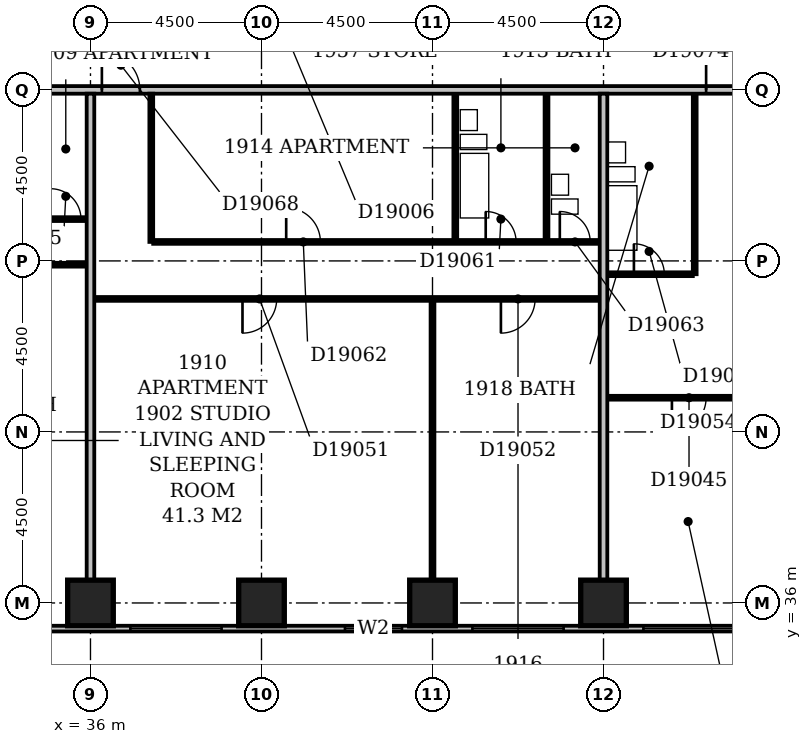
"""IFC4 building model, lengths in metres.
Left out: names, types, materials, properties, quantities, classifications, styles, units other than length and angle.
Written with IfcOpenShell. Run it as: python <this file> out.ifc"""

import sys

from ifc_helpers import new_model, si_unit, direction, frame, frame_2d, origin, origin_2d, place, context, subcontext, project, spatial, rectangle, extrude, element, fill, save


model = new_model("IFC4")
c1 = context("Model", 3, precision=1e-05, world=origin(), true_north=direction((0.0, 1.0)))
c2 = subcontext(c1, "Body", "Model", "MODEL_VIEW")
j1 = project(units=[si_unit("LENGTHUNIT", "METRE"), si_unit("PLANEANGLEUNIT", "RADIAN")], contexts=[c1])
p1 = place(None, origin())
s1 = spatial("IfcSite", under=j1, at=p1, CompositionType="ELEMENT")
p2 = place(p1, origin())
s2 = spatial("IfcBuilding", under=s1, at=p2, CompositionType="ELEMENT")
p3 = place(p2, frame((0.0, 0.0, 79.4)))
s3 = spatial("IfcBuildingStorey", under=s2, at=p3, CompositionType="ELEMENT", Elevation=79.4)
for number, where, z_axis, x_axis in (
    (1, (36.0, 36.0, -0.3), (0.0, 0.0, 1.0), (1.0, 0.0, 0.0)),
    (2, (40.5, 36.0, -0.3), (0.0, 0.0, 1.0), (1.0, 0.0, 0.0)),
    (3, (45.0, 36.0, -0.3), (0.0, 0.0, 1.0), (1.0, 0.0, 0.0)),
    (4, (49.5, 36.0, -0.3), (0.0, 0.0, 1.0), (1.0, 0.0, 0.0)),
):
    element("IfcColumn", number, at=place(p3, frame(where, z_axis=z_axis, x_axis=x_axis)), inside=s3, PredefinedType="COLUMN", context=c2, shape_type="SweptSolid", body=[
        extrude(rectangle(XDim=1.2, YDim=1.2, at=origin_2d()), origin(), (0.0, 0.0, 1.0), 3.6),
    ])
p4 = place(p3, frame((23.1, 35.325, 0.0), z_axis=(0.0, 0.0, 1.0), x_axis=(1.0, 0.0, 0.0)))
e5 = element("IfcWall", 5, at=p4, inside=s3, PredefinedType="STANDARD", context=c2, shape_type="SweptSolid", body=[
    extrude(rectangle(XDim=45.15, YDim=0.15, at=frame_2d((22.575, 0.0))), origin(), (0.0, 0.0, 1.0), 2.7),
])
p5 = place(p4, frame((0.45, 0.0, 0.6)))
e6 = element("IfcOpeningElement", 6, at=p5, cuts=e5, PredefinedType="OPENING", context=c2, shape_type="SweptSolid", body=[
    extrude(rectangle(XDim=2.4, YDim=1.8, at=frame_2d((1.2, 0.9))), frame((0.0, 0.087, 0.0), z_axis=(0.0, -1.0, 0.0), x_axis=(1.0, 0.0, 0.0)), (0.0, 0.0, 1.0), 0.174),
])
p6 = place(p4, frame((4.793, 0.0, 0.6)))
e7 = element("IfcOpeningElement", 7, at=p6, cuts=e5, PredefinedType="OPENING", context=c2, shape_type="SweptSolid", body=[
    extrude(rectangle(XDim=1.8, YDim=1.8, at=frame_2d((0.9, 0.9))), frame((0.0, 0.087, 0.0), z_axis=(0.0, -1.0, 0.0), x_axis=(1.0, 0.0, 0.0)), (0.0, 0.0, 1.0), 0.174),
])
p7 = place(p4, frame((9.45, 0.0, 0.6)))
e8 = element("IfcOpeningElement", 8, at=p7, cuts=e5, PredefinedType="OPENING", context=c2, shape_type="SweptSolid", body=[
    extrude(rectangle(XDim=2.4, YDim=1.8, at=frame_2d((1.2, 0.9))), frame((0.0, 0.087, 0.0), z_axis=(0.0, -1.0, 0.0), x_axis=(1.0, 0.0, 0.0)), (0.0, 0.0, 1.0), 0.174),
])
p8 = place(p4, frame((13.95, 0.0, 0.6)))
e9 = element("IfcOpeningElement", 9, at=p8, cuts=e5, PredefinedType="OPENING", context=c2, shape_type="SweptSolid", body=[
    extrude(rectangle(XDim=2.4, YDim=1.8, at=frame_2d((1.2, 0.9))), frame((0.0, 0.087, 0.0), z_axis=(0.0, -1.0, 0.0), x_axis=(1.0, 0.0, 0.0)), (0.0, 0.0, 1.0), 0.174),
])
p9 = place(p4, frame((19.597, 0.0, 0.6)))
e10 = element("IfcOpeningElement", 10, at=p9, cuts=e5, PredefinedType="OPENING", context=c2, shape_type="SweptSolid", body=[
    extrude(rectangle(XDim=1.5, YDim=1.8, at=frame_2d((0.75, 0.9))), frame((0.0, 0.087, 0.0), z_axis=(0.0, -1.0, 0.0), x_axis=(1.0, 0.0, 0.0)), (0.0, 0.0, 1.0), 0.174),
])
p10 = place(p4, frame((22.95, 0.0, 0.6)))
e11 = element("IfcOpeningElement", 11, at=p10, cuts=e5, PredefinedType="OPENING", context=c2, shape_type="SweptSolid", body=[
    extrude(rectangle(XDim=2.4, YDim=1.8, at=frame_2d((1.2, 0.9))), frame((0.0, 0.087, 0.0), z_axis=(0.0, -1.0, 0.0), x_axis=(1.0, 0.0, 0.0)), (0.0, 0.0, 1.0), 0.174),
])
p11 = place(p4, frame((27.45, 0.0, 0.6)))
e12 = element("IfcOpeningElement", 12, at=p11, cuts=e5, PredefinedType="OPENING", context=c2, shape_type="SweptSolid", body=[
    extrude(rectangle(XDim=2.4, YDim=1.8, at=frame_2d((1.2, 0.9))), frame((0.0, 0.087, 0.0), z_axis=(0.0, -1.0, 0.0), x_axis=(1.0, 0.0, 0.0)), (0.0, 0.0, 1.0), 0.174),
])
p12 = place(p4, frame((31.95, 0.0, 0.6)))
e13 = element("IfcOpeningElement", 13, at=p12, cuts=e5, PredefinedType="OPENING", context=c2, shape_type="SweptSolid", body=[
    extrude(rectangle(XDim=2.4, YDim=1.8, at=frame_2d((1.2, 0.9))), frame((0.0, 0.087, 0.0), z_axis=(0.0, -1.0, 0.0), x_axis=(1.0, 0.0, 0.0)), (0.0, 0.0, 1.0), 0.174),
])
p13 = place(p4, frame((37.861, 0.0, 0.6)))
e14 = element("IfcOpeningElement", 14, at=p13, cuts=e5, PredefinedType="OPENING", context=c2, shape_type="SweptSolid", body=[
    extrude(rectangle(XDim=1.2, YDim=1.8, at=frame_2d((0.6, 0.9))), frame((0.0, 0.087, 0.0), z_axis=(0.0, -1.0, 0.0), x_axis=(1.0, 0.0, 0.0)), (0.0, 0.0, 1.0), 0.174),
])
p14 = place(p4, frame((40.95, 0.0, 0.6)))
e15 = element("IfcOpeningElement", 15, at=p14, cuts=e5, PredefinedType="OPENING", context=c2, shape_type="SweptSolid", body=[
    extrude(rectangle(XDim=2.4, YDim=1.8, at=frame_2d((1.2, 0.9))), frame((0.0, 0.087, 0.0), z_axis=(0.0, -1.0, 0.0), x_axis=(1.0, 0.0, 0.0)), (0.0, 0.0, 1.0), 0.174),
])
p15 = place(p3, frame((36.0, 36.6, 0.0), z_axis=(0.0, 0.0, 1.0), x_axis=(0.0, 1.0, 0.0)))
e16 = element("IfcWall", 16, at=p15, inside=s3, PredefinedType="PARTITIONING", context=c2, shape_type="SweptSolid", body=[
    extrude(rectangle(XDim=12.8, YDim=0.2, at=frame_2d((6.4, 0.0))), origin(), (0.0, 0.0, 1.0), 2.4),
])
p16 = place(p3, frame((45.0, 36.6, 0.0), z_axis=(0.0, 0.0, 1.0), x_axis=(0.0, 1.0, 0.0)))
e17 = element("IfcWall", 17, at=p16, inside=s3, PredefinedType="PARTITIONING", context=c2, shape_type="SweptSolid", body=[
    extrude(rectangle(XDim=7.35, YDim=0.1, at=frame_2d((3.675, 0.0))), origin(), (0.0, 0.0, 1.0), 2.6),
])
p17 = place(p3, frame((49.5, 36.6, 0.0), z_axis=(0.0, 0.0, 1.0), x_axis=(0.0, 1.0, 0.0)))
e18 = element("IfcWall", 18, at=p17, inside=s3, PredefinedType="PARTITIONING", context=c2, shape_type="SweptSolid", body=[
    extrude(rectangle(XDim=12.8, YDim=0.2, at=frame_2d((6.4, 0.0))), origin(), (0.0, 0.0, 1.0), 3.3),
])
p18 = place(p3, frame((49.6, 41.4, 0.0), z_axis=(0.0, 0.0, 1.0), x_axis=(1.0, 0.0, 0.0)))
e19 = element("IfcWall", 19, at=p18, inside=s3, PredefinedType="PARTITIONING", context=c2, shape_type="SweptSolid", body=[
    extrude(rectangle(XDim=18.5, YDim=0.1, at=frame_2d((9.25, 0.0))), origin(), (0.0, 0.0, 1.0), 3.3),
])
p19 = place(p18, frame((1.7, 0.0, 0.0)))
e20 = element("IfcOpeningElement", 20, at=p19, cuts=e19, PredefinedType="OPENING", context=c2, shape_type="SweptSolid", body=[
    extrude(rectangle(XDim=0.9, YDim=2.1, at=frame_2d((0.45, 1.05))), frame((0.0, 0.062, 0.0), z_axis=(0.0, -1.0, 0.0), x_axis=(1.0, 0.0, 0.0)), (0.0, 0.0, 1.0), 0.124),
])
p20 = place(p18, frame((6.2, 0.0, 0.0)))
e21 = element("IfcOpeningElement", 21, at=p20, cuts=e19, PredefinedType="OPENING", context=c2, shape_type="SweptSolid", body=[
    extrude(rectangle(XDim=0.9, YDim=2.1, at=frame_2d((0.45, 1.05))), frame((0.0, 0.062, 0.0), z_axis=(0.0, -1.0, 0.0), x_axis=(1.0, 0.0, 0.0)), (0.0, 0.0, 1.0), 0.124),
])
p21 = place(p18, frame((11.85, 0.0, 0.0)))
e22 = element("IfcOpeningElement", 22, at=p21, cuts=e19, PredefinedType="OPENING", context=c2, shape_type="SweptSolid", body=[
    extrude(rectangle(XDim=0.9, YDim=2.1, at=frame_2d((0.45, 1.05))), frame((0.0, 0.062, 0.0), z_axis=(0.0, -1.0, 0.0), x_axis=(1.0, 0.0, 0.0)), (0.0, 0.0, 1.0), 0.124),
])
p22 = place(p18, frame((15.2, 0.0, 0.0)))
e23 = element("IfcOpeningElement", 23, at=p22, cuts=e19, PredefinedType="OPENING", context=c2, shape_type="SweptSolid", body=[
    extrude(rectangle(XDim=0.9, YDim=2.1, at=frame_2d((0.45, 1.05))), frame((0.0, 0.062, 0.0), z_axis=(0.0, -1.0, 0.0), x_axis=(1.0, 0.0, 0.0)), (0.0, 0.0, 1.0), 0.124),
])
p23 = place(p3, frame((36.1, 44.0, 0.0), z_axis=(0.0, 0.0, 1.0), x_axis=(1.0, 0.0, 0.0)))
e24 = element("IfcWall", 24, at=p23, inside=s3, PredefinedType="PARTITIONING", context=c2, shape_type="SweptSolid", body=[
    extrude(rectangle(XDim=13.3, YDim=0.1, at=frame_2d((6.65, 0.0))), origin(), (0.0, 0.0, 1.0), 3.3),
])
p24 = place(p23, frame((3.9, 0.0, 0.0)))
e25 = element("IfcOpeningElement", 25, at=p24, cuts=e24, PredefinedType="OPENING", context=c2, shape_type="SweptSolid", body=[
    extrude(rectangle(XDim=0.9, YDim=2.1, at=frame_2d((0.45, 1.05))), frame((0.0, 0.062, 0.0), z_axis=(0.0, -1.0, 0.0), x_axis=(1.0, 0.0, 0.0)), (0.0, 0.0, 1.0), 0.124),
])
p25 = place(p23, frame((10.7, 0.0, 0.0)))
e26 = element("IfcOpeningElement", 26, at=p25, cuts=e24, PredefinedType="OPENING", context=c2, shape_type="SweptSolid", body=[
    extrude(rectangle(XDim=0.9, YDim=2.1, at=frame_2d((0.45, 1.05))), frame((0.0, 0.062, 0.0), z_axis=(0.0, -1.0, 0.0), x_axis=(1.0, 0.0, 0.0)), (0.0, 0.0, 1.0), 0.124),
])
p26 = place(p3, frame((49.6, 44.65, 0.0), z_axis=(0.0, 0.0, 1.0), x_axis=(1.0, 0.0, 0.0)))
e27 = element("IfcWall", 27, at=p26, inside=s3, PredefinedType="PARTITIONING", context=c2, shape_type="SweptSolid", body=[
    extrude(rectangle(XDim=2.25, YDim=0.1, at=frame_2d((1.125, 0.0))), origin(), (0.0, 0.0, 1.0), 3.3),
])
p27 = place(p26, frame((0.7, 0.0, 0.0)))
e28 = element("IfcOpeningElement", 28, at=p27, cuts=e27, PredefinedType="OPENING", context=c2, shape_type="SweptSolid", body=[
    extrude(rectangle(XDim=0.8, YDim=2.1, at=frame_2d((0.4, 1.05))), frame((0.0, 0.062, 0.0), z_axis=(0.0, -1.0, 0.0), x_axis=(1.0, 0.0, 0.0)), (0.0, 0.0, 1.0), 0.124),
])
p28 = place(p3, frame((51.9, 44.65, 0.0), z_axis=(0.0, 0.0, 1.0), x_axis=(0.0, 1.0, 0.0)))
e29 = element("IfcWall", 29, at=p28, inside=s3, PredefinedType="PLUMBINGWALL", context=c2, shape_type="SweptSolid", body=[
    extrude(rectangle(XDim=4.75, YDim=0.1, at=frame_2d((2.375, 0.0))), origin(), (0.0, 0.0, 1.0), 3.3),
])
p29 = place(p3, frame((31.6, 44.9, 0.0), z_axis=(0.0, 0.0, 1.0), x_axis=(1.0, 0.0, 0.0)))
e30 = element("IfcWall", 30, at=p29, inside=s3, PredefinedType="PARTITIONING", context=c2, shape_type="SweptSolid", body=[
    extrude(rectangle(XDim=4.3, YDim=0.1, at=frame_2d((2.15, 0.0))), origin(), (0.0, 0.0, 1.0), 3.3),
])
p30 = place(p29, frame((1.7, 0.0, 0.0)))
e31 = element("IfcOpeningElement", 31, at=p30, cuts=e30, PredefinedType="OPENING", context=c2, shape_type="SweptSolid", body=[
    extrude(rectangle(XDim=0.9, YDim=2.1, at=frame_2d((0.45, 1.05))), frame((0.0, 0.062, 0.0), z_axis=(0.0, -1.0, 0.0), x_axis=(1.0, 0.0, 0.0)), (0.0, 0.0, 1.0), 0.124),
])
p31 = place(p3, frame((37.6, 45.5, 0.0), z_axis=(0.0, 0.0, 1.0), x_axis=(0.0, 1.0, 0.0)))
e32 = element("IfcWall", 32, at=p31, inside=s3, PredefinedType="PARTITIONING", context=c2, shape_type="SweptSolid", body=[
    extrude(rectangle(XDim=3.9, YDim=0.1, at=frame_2d((1.95, 0.0))), origin(), (0.0, 0.0, 1.0), 3.3),
])
p32 = place(p3, frame((37.65, 45.5, 0.0), z_axis=(0.0, 0.0, 1.0), x_axis=(1.0, 0.0, 0.0)))
e33 = element("IfcWall", 33, at=p32, inside=s3, PredefinedType="PARTITIONING", context=c2, shape_type="SweptSolid", body=[
    extrude(rectangle(XDim=11.75, YDim=0.1, at=frame_2d((5.875, 0.0))), origin(), (0.0, 0.0, 1.0), 3.3),
])
p33 = place(p32, frame((8.75, 0.0, 0.0)))
e34 = element("IfcOpeningElement", 34, at=p33, cuts=e33, PredefinedType="OPENING", context=c2, shape_type="SweptSolid", body=[
    extrude(rectangle(XDim=0.8, YDim=2.1, at=frame_2d((0.4, 1.05))), frame((0.0, 0.062, 0.0), z_axis=(0.0, -1.0, 0.0), x_axis=(1.0, 0.0, 0.0)), (0.0, 0.0, 1.0), 0.124),
])
p34 = place(p32, frame((3.5, 0.0, 0.0)))
e35 = element("IfcOpeningElement", 35, at=p34, cuts=e33, PredefinedType="OPENING", context=c2, shape_type="SweptSolid", body=[
    extrude(rectangle(XDim=0.9, YDim=2.1, at=frame_2d((0.45, 1.05))), frame((0.0, 0.062, 0.0), z_axis=(0.0, -1.0, 0.0), x_axis=(1.0, 0.0, 0.0)), (0.0, 0.0, 1.0), 0.124),
])
p35 = place(p32, frame((10.7, 0.0, 0.0)))
e36 = element("IfcOpeningElement", 36, at=p35, cuts=e33, PredefinedType="OPENING", context=c2, shape_type="SweptSolid", body=[
    extrude(rectangle(XDim=0.8, YDim=2.1, at=frame_2d((0.4, 1.05))), frame((0.0, 0.062, 0.0), z_axis=(0.0, -1.0, 0.0), x_axis=(1.0, 0.0, 0.0)), (0.0, 0.0, 1.0), 0.124),
])
p36 = place(p3, frame((45.6, 45.55, 0.0), z_axis=(0.0, 0.0, 1.0), x_axis=(0.0, 1.0, 0.0)))
e37 = element("IfcWall", 37, at=p36, inside=s3, PredefinedType="PLUMBINGWALL", context=c2, shape_type="SweptSolid", body=[
    extrude(rectangle(XDim=3.85, YDim=0.1, at=frame_2d((1.925, 0.0))), origin(), (0.0, 0.0, 1.0), 2.6),
])
p37 = place(p3, frame((48.0, 45.55, 0.0), z_axis=(0.0, 0.0, 1.0), x_axis=(0.0, 1.0, 0.0)))
e38 = element("IfcWall", 38, at=p37, inside=s3, PredefinedType="PLUMBINGWALL", context=c2, shape_type="SweptSolid", body=[
    extrude(rectangle(XDim=3.85, YDim=0.1, at=frame_2d((1.925, 0.0))), origin(), (0.0, 0.0, 1.0), 3.3),
])
p38 = place(p3, frame((34.75, 46.1, 0.0), z_axis=(0.0, 0.0, 1.0), x_axis=(1.0, 0.0, 0.0)))
e39 = element("IfcWall", 39, at=p38, inside=s3, PredefinedType="PARTITIONING", context=c2, shape_type="SweptSolid", body=[
    extrude(rectangle(XDim=1.15, YDim=0.1, at=frame_2d((0.575, 0.0))), origin(), (0.0, 0.0, 1.0), 3.3),
])
p39 = place(p38, frame((0.2, 0.0, 0.0)))
e40 = element("IfcOpeningElement", 40, at=p39, cuts=e39, PredefinedType="OPENING", context=c2, shape_type="SweptSolid", body=[
    extrude(rectangle(XDim=0.8, YDim=2.1, at=frame_2d((0.4, 1.05))), frame((0.0, 0.062, 0.0), z_axis=(0.0, -1.0, 0.0), x_axis=(1.0, 0.0, 0.0)), (0.0, 0.0, 1.0), 0.124),
])
p40 = place(p3, frame((9.1, 49.5, 0.0), z_axis=(0.0, 0.0, 1.0), x_axis=(1.0, 0.0, 0.0)))
e41 = element("IfcWall", 41, at=p40, inside=s3, PredefinedType="PARTITIONING", context=c2, shape_type="SweptSolid", body=[
    extrude(rectangle(XDim=57.8, YDim=0.2, at=frame_2d((28.9, 0.0))), origin(), (0.0, 0.0, 1.0), 3.3),
])
p41 = place(p40, frame((18.7, 0.0, 0.0)))
e42 = element("IfcOpeningElement", 42, at=p41, cuts=e41, PredefinedType="OPENING", context=c2, shape_type="SweptSolid", body=[
    extrude(rectangle(XDim=1.0, YDim=2.1, at=frame_2d((0.5, 1.05))), frame((0.0, 0.112, 0.0), z_axis=(0.0, -1.0, 0.0), x_axis=(1.0, 0.0, 0.0)), (0.0, 0.0, 1.0), 0.224),
])
p42 = place(p40, frame((24.35, 0.0, 0.0)))
e43 = element("IfcOpeningElement", 43, at=p42, cuts=e41, PredefinedType="OPENING", context=c2, shape_type="SweptSolid", body=[
    extrude(rectangle(XDim=1.0, YDim=2.1, at=frame_2d((0.5, 1.05))), frame((0.0, 0.112, 0.0), z_axis=(0.0, -1.0, 0.0), x_axis=(1.0, 0.0, 0.0)), (0.0, 0.0, 1.0), 0.224),
])
p43 = place(p40, frame((27.2, 0.0, 0.0)))
e44 = element("IfcOpeningElement", 44, at=p43, cuts=e41, PredefinedType="OPENING", context=c2, shape_type="SweptSolid", body=[
    extrude(rectangle(XDim=1.0, YDim=2.1, at=frame_2d((0.5, 1.05))), frame((0.0, 0.112, 0.0), z_axis=(0.0, -1.0, 0.0), x_axis=(1.0, 0.0, 0.0)), (0.0, 0.0, 1.0), 0.224),
])
p44 = place(p40, frame((43.1, 0.0, 0.0)))
e45 = element("IfcOpeningElement", 45, at=p44, cuts=e41, PredefinedType="OPENING", context=c2, shape_type="SweptSolid", body=[
    extrude(rectangle(XDim=1.0, YDim=2.1, at=frame_2d((0.5, 1.05))), frame((0.0, 0.112, 0.0), z_axis=(0.0, -1.0, 0.0), x_axis=(1.0, 0.0, 0.0)), (0.0, 0.0, 1.0), 0.224),
])
p45 = place(p40, frame((3.9, 0.0, 0.0)))
e46 = element("IfcOpeningElement", 46, at=p45, cuts=e41, PredefinedType="OPENING", context=c2, shape_type="SweptSolid", body=[
    extrude(rectangle(XDim=0.9, YDim=2.1, at=frame_2d((0.45, 1.05))), frame((0.0, 0.112, 0.0), z_axis=(0.0, -1.0, 0.0), x_axis=(1.0, 0.0, 0.0)), (0.0, 0.0, 1.0), 0.224),
])
p46 = place(p8, origin())
e47 = element("IfcWindow", 47, at=p46, inside=s3, PartitioningType="SINGLE_PANEL", PredefinedType="WINDOW", context=c2, shape_type="SweptSolid", body=[
    extrude(rectangle(XDim=2.4, YDim=1.8, at=frame_2d((1.2, 0.9))), frame((0.0, 0.03, 0.0), z_axis=(0.0, -1.0, 0.0), x_axis=(1.0, 0.0, 0.0)), (0.0, 0.0, 1.0), 0.06),
])
fill(e9, e47)
p47 = place(p9, origin())
e48 = element("IfcWindow", 48, at=p47, inside=s3, PartitioningType="SINGLE_PANEL", PredefinedType="WINDOW", context=c2, shape_type="SweptSolid", body=[
    extrude(rectangle(XDim=1.5, YDim=1.8, at=frame_2d((0.75, 0.9))), frame((0.0, 0.03, 0.0), z_axis=(0.0, -1.0, 0.0), x_axis=(1.0, 0.0, 0.0)), (0.0, 0.0, 1.0), 0.06),
])
fill(e10, e48)
p48 = place(p10, origin())
e49 = element("IfcWindow", 49, at=p48, inside=s3, PartitioningType="SINGLE_PANEL", PredefinedType="WINDOW", context=c2, shape_type="SweptSolid", body=[
    extrude(rectangle(XDim=2.4, YDim=1.8, at=frame_2d((1.2, 0.9))), frame((0.0, 0.03, 0.0), z_axis=(0.0, -1.0, 0.0), x_axis=(1.0, 0.0, 0.0)), (0.0, 0.0, 1.0), 0.06),
])
fill(e11, e49)
p49 = place(p11, origin())
e50 = element("IfcWindow", 50, at=p49, inside=s3, PartitioningType="SINGLE_PANEL", PredefinedType="WINDOW", context=c2, shape_type="SweptSolid", body=[
    extrude(rectangle(XDim=2.4, YDim=1.8, at=frame_2d((1.2, 0.9))), frame((0.0, 0.03, 0.0), z_axis=(0.0, -1.0, 0.0), x_axis=(1.0, 0.0, 0.0)), (0.0, 0.0, 1.0), 0.06),
])
fill(e12, e50)
p50 = place(p19, frame((0.9, 0.0, 0.0), z_axis=(0.0, 0.0, 1.0), x_axis=(-1.0, 0.0, 0.0)))
e51 = element("IfcDoor", 51, at=p50, inside=s3, OperationType="SINGLE_SWING_RIGHT", PredefinedType="DOOR", context=c2, shape_type="SweptSolid", body=[
    extrude(rectangle(XDim=0.9, YDim=2.1, at=frame_2d((0.45, 1.05))), frame((0.0, 0.025, 0.0), z_axis=(0.0, -1.0, 0.0), x_axis=(1.0, 0.0, 0.0)), (0.0, 0.0, 1.0), 0.05),
])
fill(e20, e51)
p51 = place(p24, frame((0.9, 0.0, 0.0), z_axis=(0.0, 0.0, 1.0), x_axis=(-1.0, 0.0, 0.0)))
e52 = element("IfcDoor", 52, at=p51, inside=s3, OperationType="SINGLE_SWING_RIGHT", PredefinedType="DOOR", context=c2, shape_type="SweptSolid", body=[
    extrude(rectangle(XDim=0.9, YDim=2.1, at=frame_2d((0.45, 1.05))), frame((0.0, 0.025, 0.0), z_axis=(0.0, -1.0, 0.0), x_axis=(1.0, 0.0, 0.0)), (0.0, 0.0, 1.0), 0.05),
])
fill(e25, e52)
p52 = place(p25, frame((0.9, 0.0, 0.0), z_axis=(0.0, 0.0, 1.0), x_axis=(-1.0, 0.0, 0.0)))
e53 = element("IfcDoor", 53, at=p52, inside=s3, OperationType="SINGLE_SWING_RIGHT", PredefinedType="DOOR", context=c2, shape_type="SweptSolid", body=[
    extrude(rectangle(XDim=0.9, YDim=2.1, at=frame_2d((0.45, 1.05))), frame((0.0, 0.025, 0.0), z_axis=(0.0, -1.0, 0.0), x_axis=(1.0, 0.0, 0.0)), (0.0, 0.0, 1.0), 0.05),
])
fill(e26, e53)
p53 = place(p27, origin())
e54 = element("IfcDoor", 54, at=p53, inside=s3, OperationType="SINGLE_SWING_LEFT", PredefinedType="DOOR", context=c2, shape_type="SweptSolid", body=[
    extrude(rectangle(XDim=0.8, YDim=2.1, at=frame_2d((0.4, 1.05))), frame((0.0, 0.025, 0.0), z_axis=(0.0, -1.0, 0.0), x_axis=(1.0, 0.0, 0.0)), (0.0, 0.0, 1.0), 0.05),
])
fill(e28, e54)
p54 = place(p33, origin())
e55 = element("IfcDoor", 55, at=p54, inside=s3, OperationType="SINGLE_SWING_LEFT", PredefinedType="DOOR", context=c2, shape_type="SweptSolid", body=[
    extrude(rectangle(XDim=0.8, YDim=2.1, at=frame_2d((0.4, 1.05))), frame((0.0, 0.025, 0.0), z_axis=(0.0, -1.0, 0.0), x_axis=(1.0, 0.0, 0.0)), (0.0, 0.0, 1.0), 0.05),
])
fill(e34, e55)
p55 = place(p34, origin())
e56 = element("IfcDoor", 56, at=p55, inside=s3, OperationType="SINGLE_SWING_LEFT", PredefinedType="DOOR", context=c2, shape_type="SweptSolid", body=[
    extrude(rectangle(XDim=0.9, YDim=2.1, at=frame_2d((0.45, 1.05))), frame((0.0, 0.025, 0.0), z_axis=(0.0, -1.0, 0.0), x_axis=(1.0, 0.0, 0.0)), (0.0, 0.0, 1.0), 0.05),
])
fill(e35, e56)
p56 = place(p35, origin())
e57 = element("IfcDoor", 57, at=p56, inside=s3, OperationType="SINGLE_SWING_LEFT", PredefinedType="DOOR", context=c2, shape_type="SweptSolid", body=[
    extrude(rectangle(XDim=0.8, YDim=2.1, at=frame_2d((0.4, 1.05))), frame((0.0, 0.025, 0.0), z_axis=(0.0, -1.0, 0.0), x_axis=(1.0, 0.0, 0.0)), (0.0, 0.0, 1.0), 0.05),
])
fill(e36, e57)
p57 = place(p39, origin())
e58 = element("IfcDoor", 58, at=p57, inside=s3, OperationType="SINGLE_SWING_LEFT", PredefinedType="DOOR", context=c2, shape_type="SweptSolid", body=[
    extrude(rectangle(XDim=0.8, YDim=2.1, at=frame_2d((0.4, 1.05))), frame((0.0, 0.025, 0.0), z_axis=(0.0, -1.0, 0.0), x_axis=(1.0, 0.0, 0.0)), (0.0, 0.0, 1.0), 0.05),
])
fill(e40, e58)
p58 = place(p43, origin())
e59 = element("IfcDoor", 59, at=p58, inside=s3, OperationType="SINGLE_SWING_LEFT", PredefinedType="DOOR", context=c2, shape_type="SweptSolid", body=[
    extrude(rectangle(XDim=1.0, YDim=2.1, at=frame_2d((0.5, 1.05))), frame((0.0, 0.025, 0.0), z_axis=(0.0, -1.0, 0.0), x_axis=(1.0, 0.0, 0.0)), (0.0, 0.0, 1.0), 0.05),
])
fill(e44, e59)
p59 = place(p44, origin())
e60 = element("IfcDoor", 60, at=p59, inside=s3, OperationType="SINGLE_SWING_LEFT", PredefinedType="DOOR", context=c2, shape_type="SweptSolid", body=[
    extrude(rectangle(XDim=1.0, YDim=2.1, at=frame_2d((0.5, 1.05))), frame((0.0, 0.025, 0.0), z_axis=(0.0, -1.0, 0.0), x_axis=(1.0, 0.0, 0.0)), (0.0, 0.0, 1.0), 0.05),
])
fill(e45, e60)
save(model, sys.argv[1])
